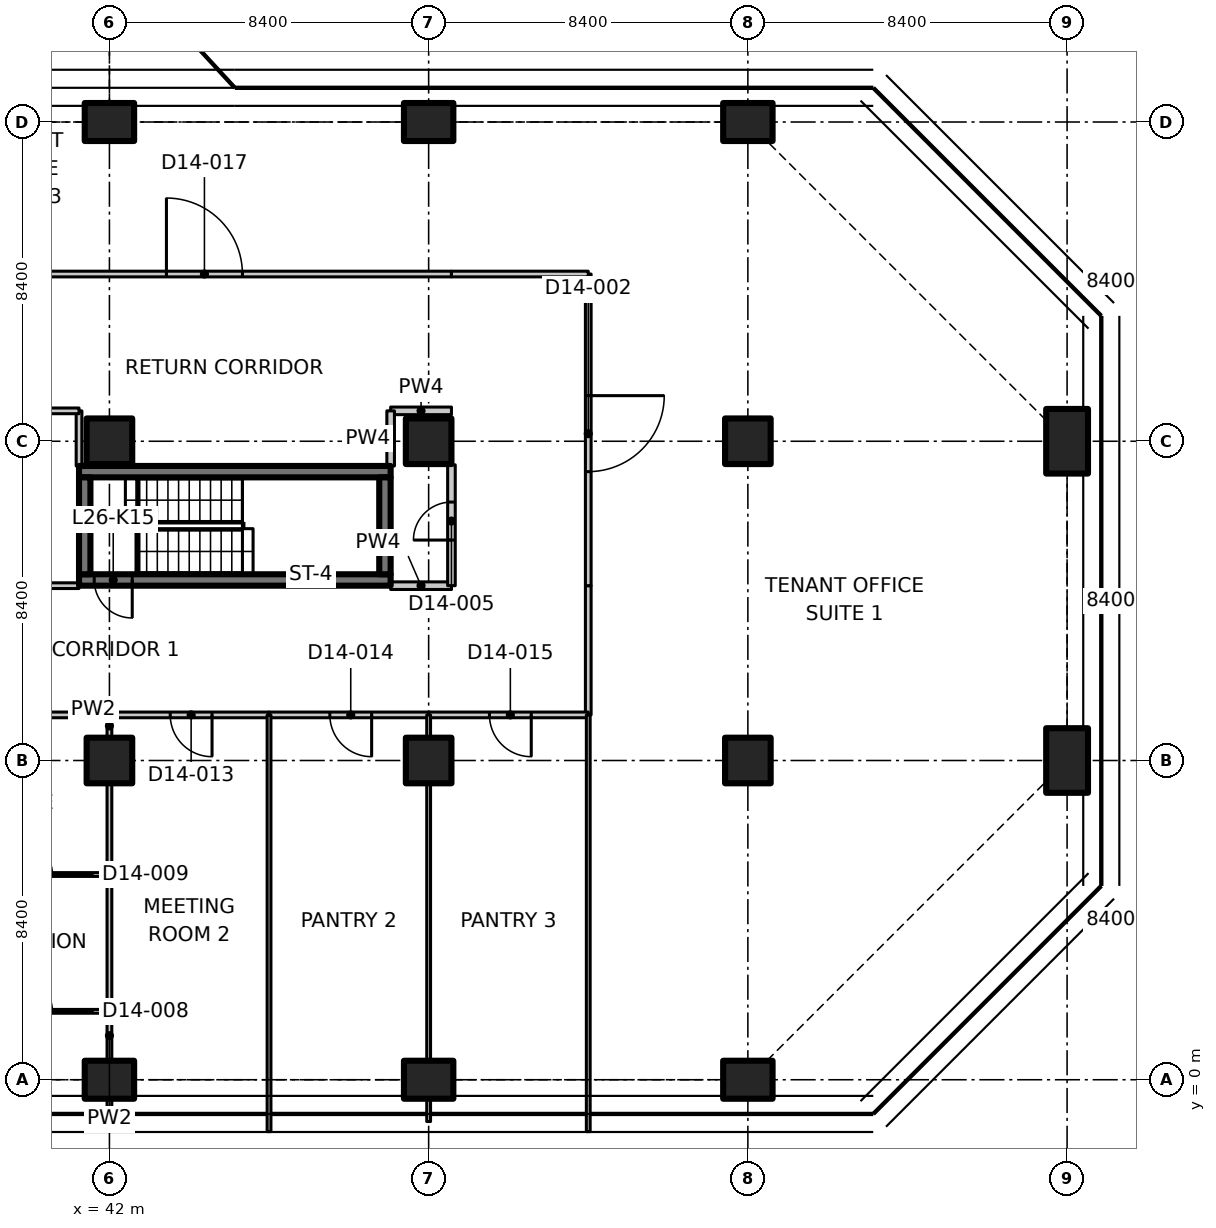
"""IFC4 building model, lengths in metres.
Left out: names, types, materials, properties, quantities, classifications, styles, units other than length and angle.
Written with IfcOpenShell. Run it as: python <this file> out.ifc"""

import sys

from ifc_helpers import new_model, si_unit, direction, frame, frame_2d, origin, origin_2d, place, context, subcontext, project, spatial, polyline, rectangle, outline, extrude, element, fill, save


model = new_model("IFC4")
c1 = context("Model", 3, precision=1e-05, world=origin(), true_north=direction((0.0, 1.0)))
c2 = subcontext(c1, "Body", "Model", "MODEL_VIEW")
j1 = project(units=[si_unit("LENGTHUNIT", "METRE"), si_unit("PLANEANGLEUNIT", "RADIAN")], contexts=[c1])
p1 = place(None, origin())
s1 = spatial("IfcSite", under=j1, at=p1, CompositionType="ELEMENT")
p2 = place(p1, origin())
s2 = spatial("IfcBuilding", under=s1, at=p2, CompositionType="ELEMENT")
p3 = place(p2, frame((0.0, 0.0, 109.7)))
s3 = spatial("IfcBuildingStorey", under=s2, at=p3, CompositionType="ELEMENT", Elevation=109.7)
p4 = place(p3, frame((42.0, 0.0, 0.0), z_axis=(0.0, 0.0, 1.0), x_axis=(0.0, 1.0, 0.0)))
e1 = element("IfcColumn", 1, at=p4, inside=s3, PredefinedType="COLUMN", context=c2, shape_type="SweptSolid", body=[
    extrude(rectangle(XDim=1.0, YDim=1.3, at=origin_2d()), origin(), (0.0, 0.0, 1.0), 3.35),
])
for number, where, z_axis, x_axis in (
    (2, (42.0, 8.4, 0.0), (0.0, 0.0, 1.0), (1.0, 0.0, 0.0)),
    (3, (42.0, 16.8, 0.0), (0.0, 0.0, 1.0), (1.0, 0.0, 0.0)),
):
    element("IfcColumn", number, at=place(p3, frame(where, z_axis=z_axis, x_axis=x_axis)), inside=s3, PredefinedType="COLUMN", context=c2, shape_type="SweptSolid", body=[
        extrude(rectangle(XDim=1.2, YDim=1.2, at=origin_2d()), origin(), (0.0, 0.0, 1.0), 3.35),
    ])
for number, where, z_axis, x_axis in (
    (4, (42.0, 25.2, 0.0), (0.0, 0.0, 1.0), (0.0, 1.0, 0.0)),
    (5, (50.4, 0.0, 0.0), (0.0, 0.0, 1.0), (0.0, 1.0, 0.0)),
):
    element("IfcColumn", number, at=place(p3, frame(where, z_axis=z_axis, x_axis=x_axis)), inside=s3, PredefinedType="COLUMN", context=c2, shape_type="SweptSolid", body=[
        extrude(rectangle(XDim=1.0, YDim=1.3, at=origin_2d()), origin(), (0.0, 0.0, 1.0), 3.35),
    ])
for number, where, z_axis, x_axis in (
    (6, (50.4, 8.4, 0.0), (0.0, 0.0, 1.0), (1.0, 0.0, 0.0)),
    (7, (50.4, 16.8, 0.0), (0.0, 0.0, 1.0), (1.0, 0.0, 0.0)),
):
    element("IfcColumn", number, at=place(p3, frame(where, z_axis=z_axis, x_axis=x_axis)), inside=s3, PredefinedType="COLUMN", context=c2, shape_type="SweptSolid", body=[
        extrude(rectangle(XDim=1.2, YDim=1.2, at=origin_2d()), origin(), (0.0, 0.0, 1.0), 3.35),
    ])
for number, where, z_axis, x_axis in (
    (8, (50.4, 25.2, 0.0), (0.0, 0.0, 1.0), (0.0, 1.0, 0.0)),
    (9, (58.8, 0.0, 0.0), (0.0, 0.0, 1.0), (0.0, 1.0, 0.0)),
):
    element("IfcColumn", number, at=place(p3, frame(where, z_axis=z_axis, x_axis=x_axis)), inside=s3, PredefinedType="COLUMN", context=c2, shape_type="SweptSolid", body=[
        extrude(rectangle(XDim=1.0, YDim=1.3, at=origin_2d()), origin(), (0.0, 0.0, 1.0), 3.35),
    ])
for number, where, z_axis, x_axis in (
    (10, (58.8, 8.4, 0.0), (0.0, 0.0, 1.0), (1.0, 0.0, 0.0)),
    (11, (58.8, 16.8, 0.0), (0.0, 0.0, 1.0), (1.0, 0.0, 0.0)),
):
    element("IfcColumn", number, at=place(p3, frame(where, z_axis=z_axis, x_axis=x_axis)), inside=s3, PredefinedType="COLUMN", context=c2, shape_type="SweptSolid", body=[
        extrude(rectangle(XDim=1.2, YDim=1.2, at=origin_2d()), origin(), (0.0, 0.0, 1.0), 3.35),
    ])
p5 = place(p3, frame((58.8, 25.2, 0.0), z_axis=(0.0, 0.0, 1.0), x_axis=(0.0, 1.0, 0.0)))
e12 = element("IfcColumn", 12, at=p5, inside=s3, PredefinedType="COLUMN", context=c2, shape_type="SweptSolid", body=[
    extrude(rectangle(XDim=1.0, YDim=1.3, at=origin_2d()), origin(), (0.0, 0.0, 1.0), 3.35),
])
for number, where, z_axis, x_axis in (
    (13, (67.2, 8.4, 0.0), (0.0, 0.0, 1.0), (1.0, 0.0, 0.0)),
    (14, (67.2, 16.8, 0.0), (0.0, 0.0, 1.0), (1.0, 0.0, 0.0)),
):
    element("IfcColumn", number, at=place(p3, frame(where, z_axis=z_axis, x_axis=x_axis)), inside=s3, PredefinedType="COLUMN", context=c2, shape_type="SweptSolid", body=[
        extrude(rectangle(XDim=1.1, YDim=1.7, at=origin_2d()), origin(), (0.0, 0.0, 1.0), 3.35),
    ])
p6 = place(p3, frame((49.4, 13.15, 0.0), z_axis=(0.0, 0.0, 1.0), x_axis=(-1.0, 0.0, 0.0)))
e15 = element("IfcWall", 15, at=p6, inside=s3, PredefinedType="SHEAR", context=c2, shape_type="SweptSolid", body=[
    extrude(rectangle(XDim=8.2, YDim=0.3, at=frame_2d((4.1, 0.0))), origin(), (0.0, 0.0, 1.0), 3.35),
])
p7 = place(p6, frame((6.8, 0.0, 0.0)))
e16 = element("IfcOpeningElement", 16, at=p7, cuts=e15, PredefinedType="OPENING", context=c2, shape_type="SweptSolid", body=[
    extrude(rectangle(XDim=1.0, YDim=2.1, at=frame_2d((0.5, 1.05))), frame((0.0, 0.16, 0.0), z_axis=(0.0, -1.0, 0.0), x_axis=(1.0, 0.0, 0.0)), (0.0, 0.0, 1.0), 0.32),
])
p8 = place(p3, frame((41.2, 16.0, 0.0), z_axis=(0.0, 0.0, 1.0), x_axis=(1.0, 0.0, 0.0)))
e17 = element("IfcWall", 17, at=p8, inside=s3, PredefinedType="SHEAR", context=c2, shape_type="SweptSolid", body=[
    extrude(rectangle(XDim=8.2, YDim=0.3, at=frame_2d((4.1, 0.0))), origin(), (0.0, 0.0, 1.0), 3.35),
])
for number, where, z_axis, x_axis in (
    (18, (41.35, 13.3, 0.0), (0.0, 0.0, 1.0), (0.0, 1.0, 0.0)),
    (19, (49.25, 13.3, 0.0), (0.0, 0.0, 1.0), (0.0, 1.0, 0.0)),
):
    element("IfcWall", number, at=place(p3, frame(where, z_axis=z_axis, x_axis=x_axis)), inside=s3, PredefinedType="SHEAR", context=c2, shape_type="SweptSolid", body=[
        extrude(rectangle(XDim=2.55, YDim=0.3, at=frame_2d((1.275, 0.0))), origin(), (0.0, 0.0, 1.0), 3.35),
    ])
p9 = place(p3, frame((54.6, 13.0, 0.0), z_axis=(0.0, 0.0, 1.0), x_axis=(0.0, -1.0, 0.0)))
e20 = element("IfcWall", 20, at=p9, inside=s3, PredefinedType="PARTITIONING", context=c2, shape_type="SweptSolid", body=[
    extrude(rectangle(XDim=3.4, YDim=0.15, at=frame_2d((1.7, 0.0))), origin(), (0.0, 0.0, 1.0), 3.33),
])
p10 = place(p3, frame((33.6, 13.0, 0.0), z_axis=(0.0, 0.0, 1.0), x_axis=(1.0, 0.0, 0.0)))
e21 = element("IfcWall", 21, at=p10, inside=s3, PredefinedType="PARTITIONING", context=c2, shape_type="SweptSolid", body=[
    extrude(rectangle(XDim=7.6, YDim=0.15, at=frame_2d((3.8, 0.0))), origin(), (0.0, 0.0, 1.0), 3.33),
])
p11 = place(p3, frame((49.4, 13.0, 0.0), z_axis=(0.0, 0.0, 1.0), x_axis=(1.0, 0.0, 0.0)))
e22 = element("IfcWall", 22, at=p11, inside=s3, PredefinedType="PARTITIONING", context=c2, shape_type="SweptSolid", body=[
    extrude(rectangle(XDim=1.6, YDim=0.2, at=frame_2d((0.8, 0.0))), origin(), (0.0, 0.0, 1.0), 3.33),
])
p12 = place(p3, frame((42.0, 9.6, 0.0), z_axis=(0.0, 0.0, 1.0), x_axis=(-1.0, 0.0, 0.0)))
e23 = element("IfcWall", 23, at=p12, inside=s3, PredefinedType="PARTITIONING", context=c2, shape_type="SweptSolid", body=[
    extrude(rectangle(XDim=4.2, YDim=0.15, at=frame_2d((2.1, 0.0))), origin(), (0.0, 0.0, 1.0), 3.33),
])
p13 = place(p3, frame((46.2, 9.6, 0.0), z_axis=(0.0, 0.0, 1.0), x_axis=(-1.0, 0.0, 0.0)))
e24 = element("IfcWall", 24, at=p13, inside=s3, PredefinedType="PARTITIONING", context=c2, shape_type="SweptSolid", body=[
    extrude(rectangle(XDim=4.2, YDim=0.15, at=frame_2d((2.1, 0.0))), origin(), (0.0, 0.0, 1.0), 3.33),
])
p14 = place(p13, frame((1.5, 0.0, 0.0)))
e25 = element("IfcOpeningElement", 25, at=p14, cuts=e24, PredefinedType="OPENING", context=c2, shape_type="SweptSolid", body=[
    extrude(rectangle(XDim=1.1, YDim=2.1, at=frame_2d((0.55, 1.05))), frame((0.0, 0.085, 0.0), z_axis=(0.0, -1.0, 0.0), x_axis=(1.0, 0.0, 0.0)), (0.0, 0.0, 1.0), 0.17),
])
p15 = place(p3, frame((50.4, 9.6, 0.0), z_axis=(0.0, 0.0, 1.0), x_axis=(-1.0, 0.0, 0.0)))
e26 = element("IfcWall", 26, at=p15, inside=s3, PredefinedType="PARTITIONING", context=c2, shape_type="SweptSolid", body=[
    extrude(rectangle(XDim=4.2, YDim=0.15, at=frame_2d((2.1, 0.0))), origin(), (0.0, 0.0, 1.0), 3.33),
])
p16 = place(p15, frame((1.5, 0.0, 0.0)))
e27 = element("IfcOpeningElement", 27, at=p16, cuts=e26, PredefinedType="OPENING", context=c2, shape_type="SweptSolid", body=[
    extrude(rectangle(XDim=1.1, YDim=2.1, at=frame_2d((0.55, 1.05))), frame((0.0, 0.085, 0.0), z_axis=(0.0, -1.0, 0.0), x_axis=(1.0, 0.0, 0.0)), (0.0, 0.0, 1.0), 0.17),
])
p17 = place(p3, frame((54.6, 9.6, 0.0), z_axis=(0.0, 0.0, 1.0), x_axis=(-1.0, 0.0, 0.0)))
e28 = element("IfcWall", 28, at=p17, inside=s3, PredefinedType="PARTITIONING", context=c2, shape_type="SweptSolid", body=[
    extrude(rectangle(XDim=4.2, YDim=0.15, at=frame_2d((2.1, 0.0))), origin(), (0.0, 0.0, 1.0), 3.33),
])
p18 = place(p17, frame((1.5, 0.0, 0.0)))
e29 = element("IfcOpeningElement", 29, at=p18, cuts=e28, PredefinedType="OPENING", context=c2, shape_type="SweptSolid", body=[
    extrude(rectangle(XDim=1.1, YDim=2.1, at=frame_2d((0.55, 1.05))), frame((0.0, 0.085, 0.0), z_axis=(0.0, -1.0, 0.0), x_axis=(1.0, 0.0, 0.0)), (0.0, 0.0, 1.0), 0.17),
])
p19 = place(p3, frame((54.6, 21.2, 0.0), z_axis=(0.0, 0.0, 1.0), x_axis=(0.0, -1.0, 0.0)))
e30 = element("IfcWall", 30, at=p19, inside=s3, PredefinedType="PARTITIONING", context=c2, shape_type="SweptSolid", body=[
    extrude(rectangle(XDim=8.2, YDim=0.15, at=frame_2d((4.1, 0.0))), origin(), (0.0, 0.0, 1.0), 3.33),
])
p20 = place(p19, frame((3.2, 0.0, 0.0)))
e31 = element("IfcOpeningElement", 31, at=p20, cuts=e30, PredefinedType="OPENING", context=c2, shape_type="SweptSolid", body=[
    extrude(rectangle(XDim=2.0, YDim=2.4, at=frame_2d((1.0, 1.2))), frame((0.0, 0.085, 0.0), z_axis=(0.0, -1.0, 0.0), x_axis=(1.0, 0.0, 0.0)), (0.0, 0.0, 1.0), 0.17),
])
p21 = place(p3, frame((54.6, -1.365, 0.0), z_axis=(0.0, 0.0, 1.0), x_axis=(0.0, 1.0, 0.0)))
e32 = element("IfcWall", 32, at=p21, inside=s3, PredefinedType="PARTITIONING", context=c2, shape_type="SweptSolid", body=[
    extrude(outline(polyline([(0.0, 0.0), (10.965, 0.0), (10.965, 3.33), (1.815, 3.33), (1.813, 2.98), (0.917, 2.98), (0.915, 3.33), (0.265, 3.33), (0.0, 3.33), (0.0, 0.0)])), frame((0.0, 0.05, 0.0), z_axis=(0.0, -1.0, 0.0), x_axis=(1.0, 0.0, 0.0)), (0.0, 0.0, 1.0), 0.1),
])
p22 = place(p3, frame((41.2, 16.15, 0.0), z_axis=(0.0, 0.0, 1.0), x_axis=(0.0, 1.0, 0.0)))
e33 = element("IfcWall", 33, at=p22, inside=s3, PredefinedType="PARTITIONING", context=c2, shape_type="SweptSolid", body=[
    extrude(rectangle(XDim=1.45, YDim=0.15, at=frame_2d((0.725, 0.0))), origin(), (0.0, 0.0, 1.0), 3.33),
])
p23 = place(p3, frame((41.2, 17.6, 0.0), z_axis=(0.0, 0.0, 1.0), x_axis=(-1.0, 0.0, 0.0)))
e34 = element("IfcWall", 34, at=p23, inside=s3, PredefinedType="PARTITIONING", context=c2, shape_type="SweptSolid", body=[
    extrude(rectangle(XDim=7.6, YDim=0.15, at=frame_2d((3.8, 0.0))), origin(), (0.0, 0.0, 1.0), 3.33),
])
p24 = place(p23, frame((3.3, 0.0, 0.0)))
e35 = element("IfcOpeningElement", 35, at=p24, cuts=e34, PredefinedType="OPENING", context=c2, shape_type="SweptSolid", body=[
    extrude(rectangle(XDim=1.1, YDim=2.1, at=frame_2d((0.55, 1.05))), frame((0.0, 0.085, 0.0), z_axis=(0.0, -1.0, 0.0), x_axis=(1.0, 0.0, 0.0)), (0.0, 0.0, 1.0), 0.17),
])
p25 = place(p3, frame((51.0, 17.6, 0.0), z_axis=(0.0, 0.0, 1.0), x_axis=(-1.0, 0.0, 0.0)))
e36 = element("IfcWall", 36, at=p25, inside=s3, PredefinedType="PARTITIONING", context=c2, shape_type="SweptSolid", body=[
    extrude(rectangle(XDim=1.6, YDim=0.2, at=frame_2d((0.8, 0.0))), origin(), (0.0, 0.0, 1.0), 3.33),
])
p26 = place(p3, frame((49.4, 17.6, 0.0), z_axis=(0.0, 0.0, 1.0), x_axis=(0.0, -1.0, 0.0)))
e37 = element("IfcWall", 37, at=p26, inside=s3, PredefinedType="PARTITIONING", context=c2, shape_type="SweptSolid", body=[
    extrude(rectangle(XDim=1.45, YDim=0.2, at=frame_2d((0.725, 0.0))), origin(), (0.0, 0.0, 1.0), 3.33),
])
p27 = place(p3, frame((37.8, 21.2, 0.0), z_axis=(0.0, 0.0, 1.0), x_axis=(1.0, 0.0, 0.0)))
e38 = element("IfcWall", 38, at=p27, inside=s3, PredefinedType="PARTITIONING", context=c2, shape_type="SweptSolid", body=[
    extrude(rectangle(XDim=13.2, YDim=0.15, at=frame_2d((6.6, 0.0))), origin(), (0.0, 0.0, 1.0), 3.33),
])
p28 = place(p27, frame((5.7, 0.0, 0.0)))
e39 = element("IfcOpeningElement", 39, at=p28, cuts=e38, PredefinedType="OPENING", context=c2, shape_type="SweptSolid", body=[
    extrude(rectangle(XDim=2.0, YDim=2.4, at=frame_2d((1.0, 1.2))), frame((0.0, 0.085, 0.0), z_axis=(0.0, -1.0, 0.0), x_axis=(1.0, 0.0, 0.0)), (0.0, 0.0, 1.0), 0.17),
])
p29 = place(p3, frame((51.0, 13.0, 0.0), z_axis=(0.0, 0.0, 1.0), x_axis=(0.0, 1.0, 0.0)))
e40 = element("IfcWall", 40, at=p29, inside=s3, PredefinedType="PARTITIONING", context=c2, shape_type="SweptSolid", body=[
    extrude(rectangle(XDim=3.18, YDim=0.2, at=frame_2d((1.59, 0.0))), origin(), (0.0, 0.0, 1.0), 3.33),
])
p30 = place(p29, frame((1.2, 0.0, 0.0)))
e41 = element("IfcOpeningElement", 41, at=p30, cuts=e40, PredefinedType="OPENING", context=c2, shape_type="SweptSolid", body=[
    extrude(rectangle(XDim=1.0, YDim=2.1, at=frame_2d((0.5, 1.05))), frame((0.0, 0.11, 0.0), z_axis=(0.0, -1.0, 0.0), x_axis=(1.0, 0.0, 0.0)), (0.0, 0.0, 1.0), 0.22),
])
p31 = place(p3, frame((51.0, 21.2, 0.0), z_axis=(0.0, 0.0, 1.0), x_axis=(1.0, 0.0, 0.0)))
e42 = element("IfcWall", 42, at=p31, inside=s3, PredefinedType="PARTITIONING", context=c2, shape_type="SweptSolid", body=[
    extrude(rectangle(XDim=3.6, YDim=0.15, at=frame_2d((1.8, 0.0))), origin(), (0.0, 0.0, 1.0), 3.33),
])
p32 = place(p3, frame((37.8, 1.8, 0.0), z_axis=(0.0, 0.0, 1.0), x_axis=(1.0, 0.0, 0.0)))
e43 = element("IfcWall", 43, at=p32, inside=s3, PredefinedType="PARTITIONING", context=c2, shape_type="SweptSolid", body=[
    extrude(rectangle(XDim=4.2, YDim=0.1, at=frame_2d((2.1, 0.0))), origin(), (0.0, 0.0, 1.0), 3.33),
])
p33 = place(p32, frame((1.8, 0.0, 0.0)))
e44 = element("IfcOpeningElement", 44, at=p33, cuts=e43, PredefinedType="OPENING", context=c2, shape_type="SweptSolid", body=[
    extrude(rectangle(XDim=0.9, YDim=2.1, at=frame_2d((0.45, 1.05))), frame((0.0, 0.06, 0.0), z_axis=(0.0, -1.0, 0.0), x_axis=(1.0, 0.0, 0.0)), (0.0, 0.0, 1.0), 0.12),
])
p34 = place(p3, frame((42.0, 1.8, 0.0), z_axis=(0.0, 0.0, 1.0), x_axis=(0.0, -1.0, 0.0)))
e45 = element("IfcWall", 45, at=p34, inside=s3, PredefinedType="PARTITIONING", context=c2, shape_type="SweptSolid", body=[
    extrude(rectangle(XDim=1.28, YDim=0.125, at=frame_2d((0.64, 0.0))), origin(), (0.0, 0.0, 1.0), 3.33),
])
p35 = place(p3, frame((42.0, -0.52, 0.0), z_axis=(0.0, 0.0, 1.0), x_axis=(0.0, -1.0, 0.0)))
e46 = element("IfcWall", 46, at=p35, inside=s3, PredefinedType="PARTITIONING", context=c2, shape_type="SweptSolid", body=[
    extrude(rectangle(XDim=0.58, YDim=0.125, at=frame_2d((0.29, 0.0))), origin(), (0.0, 0.0, 1.0), 3.33),
])
p36 = place(p3, frame((37.8, 5.4, 0.0), z_axis=(0.0, 0.0, 1.0), x_axis=(1.0, 0.0, 0.0)))
e47 = element("IfcWall", 47, at=p36, inside=s3, PredefinedType="PARTITIONING", context=c2, shape_type="SweptSolid", body=[
    extrude(rectangle(XDim=4.2, YDim=0.1, at=frame_2d((2.1, 0.0))), origin(), (0.0, 0.0, 1.0), 3.33),
])
p37 = place(p36, frame((1.8, 0.0, 0.0)))
e48 = element("IfcOpeningElement", 48, at=p37, cuts=e47, PredefinedType="OPENING", context=c2, shape_type="SweptSolid", body=[
    extrude(rectangle(XDim=0.9, YDim=2.1, at=frame_2d((0.45, 1.05))), frame((0.0, 0.06, 0.0), z_axis=(0.0, -1.0, 0.0), x_axis=(1.0, 0.0, 0.0)), (0.0, 0.0, 1.0), 0.12),
])
p38 = place(p3, frame((42.0, 5.4, 0.0), z_axis=(0.0, 0.0, 1.0), x_axis=(0.0, -1.0, 0.0)))
e49 = element("IfcWall", 49, at=p38, inside=s3, PredefinedType="PARTITIONING", context=c2, shape_type="SweptSolid", body=[
    extrude(rectangle(XDim=3.6, YDim=0.125, at=frame_2d((1.8, 0.0))), origin(), (0.0, 0.0, 1.0), 3.33),
])
p39 = place(p3, frame((42.0, 9.6, 0.0), z_axis=(0.0, 0.0, 1.0), x_axis=(0.0, -1.0, 0.0)))
e50 = element("IfcWall", 50, at=p39, inside=s3, PredefinedType="PARTITIONING", context=c2, shape_type="SweptSolid", body=[
    extrude(rectangle(XDim=0.58, YDim=0.125, at=frame_2d((0.29, 0.0))), origin(), (0.0, 0.0, 1.0), 3.33),
])
p40 = place(p3, frame((42.0, 7.78, 0.0), z_axis=(0.0, 0.0, 1.0), x_axis=(0.0, -1.0, 0.0)))
e51 = element("IfcWall", 51, at=p40, inside=s3, PredefinedType="PARTITIONING", context=c2, shape_type="SweptSolid", body=[
    extrude(rectangle(XDim=2.38, YDim=0.125, at=frame_2d((1.19, 0.0))), origin(), (0.0, 0.0, 1.0), 3.33),
])
p41 = place(p3, frame((46.2, 9.6, 0.0), z_axis=(0.0, 0.0, 1.0), x_axis=(0.0, -1.0, 0.0)))
e52 = element("IfcWall", 52, at=p41, inside=s3, PredefinedType="PARTITIONING", context=c2, shape_type="SweptSolid", body=[
    extrude(outline(polyline([(0.0, 0.0), (10.965, 0.0), (10.965, 3.33), (10.7, 3.33), (10.05, 3.33), (10.048, 2.98), (9.152, 2.98), (9.15, 3.33), (0.0, 3.33), (0.0, 0.0)])), frame((0.0, 0.05, 0.0), z_axis=(0.0, -1.0, 0.0), x_axis=(1.0, 0.0, 0.0)), (0.0, 0.0, 1.0), 0.1),
])
p42 = place(p3, frame((50.4, 9.6, 0.0), z_axis=(0.0, 0.0, 1.0), x_axis=(0.0, -1.0, 0.0)))
e53 = element("IfcWall", 53, at=p42, inside=s3, PredefinedType="PARTITIONING", context=c2, shape_type="SweptSolid", body=[
    extrude(rectangle(XDim=0.58, YDim=0.1, at=frame_2d((0.29, 0.0))), origin(), (0.0, 0.0, 1.0), 3.33),
])
p43 = place(p3, frame((50.4, 7.78, 0.0), z_axis=(0.0, 0.0, 1.0), x_axis=(0.0, -1.0, 0.0)))
e54 = element("IfcWall", 54, at=p43, inside=s3, PredefinedType="PARTITIONING", context=c2, shape_type="SweptSolid", body=[
    extrude(rectangle(XDim=7.26, YDim=0.1, at=frame_2d((3.63, 0.0))), origin(), (0.0, 0.0, 1.0), 3.33),
])
p44 = place(p3, frame((50.4, -0.52, 0.0), z_axis=(0.0, 0.0, 1.0), x_axis=(0.0, -1.0, 0.0)))
e55 = element("IfcWall", 55, at=p44, inside=s3, PredefinedType="PARTITIONING", context=c2, shape_type="SweptSolid", body=[
    extrude(rectangle(XDim=0.58, YDim=0.1, at=frame_2d((0.29, 0.0))), origin(), (0.0, 0.0, 1.0), 3.33),
])
p45 = place(p7, origin())
e56 = element("IfcDoor", 56, at=p45, inside=s3, OperationType="SINGLE_SWING_LEFT", PredefinedType="DOOR", context=c2, shape_type="SweptSolid", body=[
    extrude(rectangle(XDim=1.0, YDim=2.1, at=frame_2d((0.5, 1.05))), frame((0.0, 0.025, 0.0), z_axis=(0.0, -1.0, 0.0), x_axis=(1.0, 0.0, 0.0)), (0.0, 0.0, 1.0), 0.05),
])
fill(e16, e56)
p46 = place(p20, origin())
e57 = element("IfcDoor", 57, at=p46, inside=s3, OperationType="DOUBLE_DOOR_SINGLE_SWING", PredefinedType="DOOR", context=c2, shape_type="SweptSolid", body=[
    extrude(rectangle(XDim=2.0, YDim=2.4, at=frame_2d((1.0, 1.2))), frame((0.0, 0.025, 0.0), z_axis=(0.0, -1.0, 0.0), x_axis=(1.0, 0.0, 0.0)), (0.0, 0.0, 1.0), 0.05),
])
fill(e31, e57)
p47 = place(p30, origin())
e58 = element("IfcDoor", 58, at=p47, inside=s3, OperationType="SINGLE_SWING_LEFT", PredefinedType="DOOR", context=c2, shape_type="SweptSolid", body=[
    extrude(rectangle(XDim=1.0, YDim=2.1, at=frame_2d((0.5, 1.05))), frame((0.0, 0.025, 0.0), z_axis=(0.0, -1.0, 0.0), x_axis=(1.0, 0.0, 0.0)), (0.0, 0.0, 1.0), 0.05),
])
fill(e41, e58)
p48 = place(p14, origin())
e59 = element("IfcDoor", 59, at=p48, inside=s3, OperationType="SINGLE_SWING_LEFT", PredefinedType="DOOR", context=c2, shape_type="SweptSolid", body=[
    extrude(rectangle(XDim=1.1, YDim=2.1, at=frame_2d((0.55, 1.05))), frame((0.0, 0.025, 0.0), z_axis=(0.0, -1.0, 0.0), x_axis=(1.0, 0.0, 0.0)), (0.0, 0.0, 1.0), 0.05),
])
fill(e25, e59)
p49 = place(p16, origin())
e60 = element("IfcDoor", 60, at=p49, inside=s3, OperationType="SINGLE_SWING_LEFT", PredefinedType="DOOR", context=c2, shape_type="SweptSolid", body=[
    extrude(rectangle(XDim=1.1, YDim=2.1, at=frame_2d((0.55, 1.05))), frame((0.0, 0.025, 0.0), z_axis=(0.0, -1.0, 0.0), x_axis=(1.0, 0.0, 0.0)), (0.0, 0.0, 1.0), 0.05),
])
fill(e27, e60)
p50 = place(p18, origin())
e61 = element("IfcDoor", 61, at=p50, inside=s3, OperationType="SINGLE_SWING_LEFT", PredefinedType="DOOR", context=c2, shape_type="SweptSolid", body=[
    extrude(rectangle(XDim=1.1, YDim=2.1, at=frame_2d((0.55, 1.05))), frame((0.0, 0.025, 0.0), z_axis=(0.0, -1.0, 0.0), x_axis=(1.0, 0.0, 0.0)), (0.0, 0.0, 1.0), 0.05),
])
fill(e29, e61)
p51 = place(p28, origin())
e62 = element("IfcDoor", 62, at=p51, inside=s3, OperationType="DOUBLE_DOOR_SINGLE_SWING", PredefinedType="DOOR", context=c2, shape_type="SweptSolid", body=[
    extrude(rectangle(XDim=2.0, YDim=2.4, at=frame_2d((1.0, 1.2))), frame((0.0, 0.025, 0.0), z_axis=(0.0, -1.0, 0.0), x_axis=(1.0, 0.0, 0.0)), (0.0, 0.0, 1.0), 0.05),
])
fill(e39, e62)
save(model, sys.argv[1])
